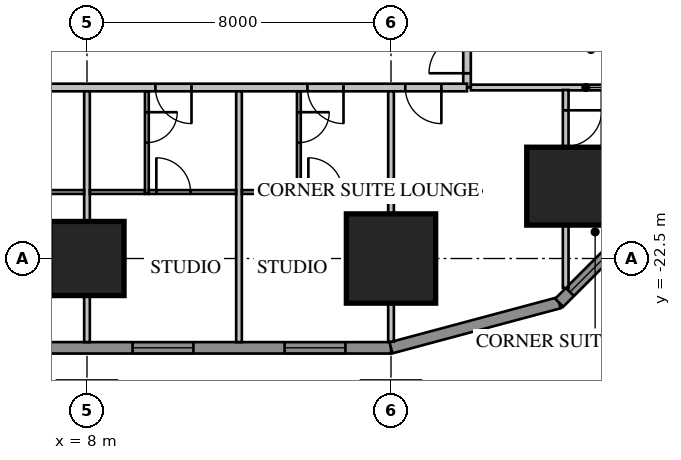
"""IFC4 building model, lengths in metres.
Left out: names, types, materials, properties, quantities, classifications, styles, units other than length and angle.
Written with IfcOpenShell. Run it as: python <this file> out.ifc"""

import sys

from ifc_helpers import new_model, si_unit, direction, frame, frame_2d, origin, origin_2d, place, context, subcontext, project, spatial, rectangle, extrude, element, fill, save


model = new_model("IFC4")
c1 = context("Model", 3, precision=1e-05, world=origin(), true_north=direction((0.0, 1.0)))
c2 = subcontext(c1, "Body", "Model", "MODEL_VIEW")
j1 = project(units=[si_unit("LENGTHUNIT", "METRE"), si_unit("PLANEANGLEUNIT", "RADIAN")], contexts=[c1])
p1 = place(None, origin())
s1 = spatial("IfcSite", under=j1, at=p1, CompositionType="ELEMENT")
p2 = place(p1, origin())
s2 = spatial("IfcBuilding", under=s1, at=p2, CompositionType="ELEMENT")
p3 = place(p2, frame((0.0, 0.0, 27.55)))
s3 = spatial("IfcBuildingStorey", under=s2, at=p3, CompositionType="ELEMENT", Elevation=27.55)
p4 = place(p3, frame((8.0, -22.5, 0.0), z_axis=(0.0, 0.0, 1.0), x_axis=(1.0, 0.0, 0.0)))
e1 = element("IfcColumn", 1, at=p4, inside=s3, PredefinedType="COLUMN", context=c2, shape_type="SweptSolid", body=[
    extrude(rectangle(XDim=1.95, YDim=1.95, at=origin_2d()), origin(), (0.0, 0.0, 1.0), 3.85),
])
p5 = place(p3, frame((16.0, -22.5, 0.0), z_axis=(0.0, 0.0, 1.0), x_axis=(1.0, 0.0, 0.0)))
e2 = element("IfcColumn", 2, at=p5, inside=s3, PredefinedType="COLUMN", context=c2, shape_type="SweptSolid", body=[
    extrude(rectangle(XDim=2.35, YDim=2.35, at=origin_2d()), origin(), (0.0, 0.0, 1.0), 3.85),
])
p6 = place(p3, frame((20.596, -20.596, 0.0), z_axis=(0.0, 0.0, 1.0), x_axis=(1.0, 0.0, 0.0)))
e3 = element("IfcColumn", 3, at=p6, inside=s3, PredefinedType="COLUMN", context=c2, shape_type="SweptSolid", body=[
    extrude(rectangle(XDim=2.05, YDim=2.05, at=origin_2d()), origin(), (0.0, 0.0, 1.0), 3.85),
])
p7 = place(p3, frame((-16.0, -24.85, 0.0), z_axis=(0.0, 0.0, 1.0), x_axis=(1.0, 0.0, 0.0)))
e4 = element("IfcWall", 4, at=p7, inside=s3, PredefinedType="SOLIDWALL", context=c2, shape_type="SweptSolid", body=[
    extrude(rectangle(XDim=32.0, YDim=0.3, at=frame_2d((16.0, 0.0))), origin(), (0.0, 0.0, 1.0), 3.65),
])
p8 = place(p7, frame((1.2, 0.0, 0.75)))
e5 = element("IfcOpeningElement", 5, at=p8, cuts=e4, PredefinedType="OPENING", context=c2, shape_type="SweptSolid", body=[
    extrude(rectangle(XDim=1.6, YDim=1.8, at=frame_2d((0.8, 0.9))), frame((0.0, 0.17, 0.0), z_axis=(0.0, -1.0, 0.0), x_axis=(1.0, 0.0, 0.0)), (0.0, 0.0, 1.0), 0.34),
])
p9 = place(p7, frame((5.2, 0.0, 0.75)))
e6 = element("IfcOpeningElement", 6, at=p9, cuts=e4, PredefinedType="OPENING", context=c2, shape_type="SweptSolid", body=[
    extrude(rectangle(XDim=1.6, YDim=1.8, at=frame_2d((0.8, 0.9))), frame((0.0, 0.17, 0.0), z_axis=(0.0, -1.0, 0.0), x_axis=(1.0, 0.0, 0.0)), (0.0, 0.0, 1.0), 0.34),
])
p10 = place(p7, frame((17.2, 0.0, 0.75)))
e7 = element("IfcOpeningElement", 7, at=p10, cuts=e4, PredefinedType="OPENING", context=c2, shape_type="SweptSolid", body=[
    extrude(rectangle(XDim=1.6, YDim=1.8, at=frame_2d((0.8, 0.9))), frame((0.0, 0.17, 0.0), z_axis=(0.0, -1.0, 0.0), x_axis=(1.0, 0.0, 0.0)), (0.0, 0.0, 1.0), 0.34),
])
p11 = place(p7, frame((21.2, 0.0, 0.75)))
e8 = element("IfcOpeningElement", 8, at=p11, cuts=e4, PredefinedType="OPENING", context=c2, shape_type="SweptSolid", body=[
    extrude(rectangle(XDim=1.6, YDim=1.8, at=frame_2d((0.8, 0.9))), frame((0.0, 0.17, 0.0), z_axis=(0.0, -1.0, 0.0), x_axis=(1.0, 0.0, 0.0)), (0.0, 0.0, 1.0), 0.34),
])
p12 = place(p7, frame((25.2, 0.0, 0.75)))
e9 = element("IfcOpeningElement", 9, at=p12, cuts=e4, PredefinedType="OPENING", context=c2, shape_type="SweptSolid", body=[
    extrude(rectangle(XDim=1.6, YDim=1.8, at=frame_2d((0.8, 0.9))), frame((0.0, 0.17, 0.0), z_axis=(0.0, -1.0, 0.0), x_axis=(1.0, 0.0, 0.0)), (0.0, 0.0, 1.0), 0.34),
])
p13 = place(p7, frame((29.2, 0.0, 0.75)))
e10 = element("IfcOpeningElement", 10, at=p13, cuts=e4, PredefinedType="OPENING", context=c2, shape_type="SweptSolid", body=[
    extrude(rectangle(XDim=1.6, YDim=1.8, at=frame_2d((0.8, 0.9))), frame((0.0, 0.17, 0.0), z_axis=(0.0, -1.0, 0.0), x_axis=(1.0, 0.0, 0.0)), (0.0, 0.0, 1.0), 0.34),
])
p14 = place(p7, frame((8.8, 0.0, 0.75)))
e11 = element("IfcOpeningElement", 11, at=p14, cuts=e4, PredefinedType="OPENING", context=c2, shape_type="SweptSolid", body=[
    extrude(rectangle(XDim=2.4, YDim=1.8, at=frame_2d((1.2, 0.9))), frame((0.0, 0.17, 0.0), z_axis=(0.0, -1.0, 0.0), x_axis=(1.0, 0.0, 0.0)), (0.0, 0.0, 1.0), 0.34),
])
p15 = place(p7, frame((13.812, 0.0, 0.0)))
e12 = element("IfcOpeningElement", 12, at=p15, cuts=e4, PredefinedType="OPENING", context=c2, shape_type="SweptSolid", body=[
    extrude(rectangle(XDim=1.0, YDim=2.4, at=frame_2d((0.5, 1.2))), frame((0.0, 0.17, 0.0), z_axis=(0.0, -1.0, 0.0), x_axis=(1.0, 0.0, 0.0)), (0.0, 0.0, 1.0), 0.34),
])
p16 = place(p3, frame((16.0, -24.85, 0.0), z_axis=(0.0, 0.0, 1.0), x_axis=(0.965920218567, 0.258839972501, 0.0)))
e13 = element("IfcWall", 13, at=p16, inside=s3, PredefinedType="SOLIDWALL", context=c2, shape_type="SweptSolid", body=[
    extrude(rectangle(XDim=4.581, YDim=0.3, at=frame_2d((2.291, 0.0))), origin(), (0.0, 0.0, 1.0), 3.65),
])
p17 = place(p3, frame((20.425, -23.664, 0.0), z_axis=(0.0, 0.0, 1.0), x_axis=(0.707106781187, 0.707106781187, 0.0)))
e14 = element("IfcWall", 14, at=p17, inside=s3, PredefinedType="SOLIDWALL", context=c2, shape_type="SweptSolid", body=[
    extrude(rectangle(XDim=4.581, YDim=0.3, at=frame_2d((2.291, 0.0))), origin(), (0.0, 0.0, 1.0), 3.65),
])
p18 = place(p17, frame((0.4, 0.0, 0.75)))
e15 = element("IfcOpeningElement", 15, at=p18, cuts=e14, PredefinedType="OPENING", context=c2, shape_type="SweptSolid", body=[
    extrude(rectangle(XDim=3.781, YDim=1.8, at=frame_2d((1.891, 0.9))), frame((0.0, 0.17, 0.0), z_axis=(0.0, -1.0, 0.0), x_axis=(1.0, 0.0, 0.0)), (0.0, 0.0, 1.0), 0.34),
])
p19 = place(p3, frame((18.0, -18.0, 0.0), z_axis=(0.0, 0.0, 1.0), x_axis=(0.0, 1.0, 0.0)))
e16 = element("IfcWall", 16, at=p19, inside=s3, PredefinedType="PARTITIONING", context=c2, shape_type="SweptSolid", body=[
    extrude(rectangle(XDim=36.0, YDim=0.2, at=frame_2d((18.0, 0.0))), origin(), (0.0, 0.0, 1.0), 3.65),
])
p20 = place(p19, frame((10.4, 0.0, 0.0)))
e17 = element("IfcOpeningElement", 17, at=p20, cuts=e16, PredefinedType="OPENING", context=c2, shape_type="SweptSolid", body=[
    extrude(rectangle(XDim=1.0, YDim=2.1, at=frame_2d((0.5, 1.05))), frame((0.0, 0.12, 0.0), z_axis=(0.0, -1.0, 0.0), x_axis=(1.0, 0.0, 0.0)), (0.0, 0.0, 1.0), 0.24),
])
p21 = place(p19, frame((0.375, 0.0, 0.0)))
e18 = element("IfcOpeningElement", 18, at=p21, cuts=e16, PredefinedType="OPENING", context=c2, shape_type="SweptSolid", body=[
    extrude(rectangle(XDim=1.0, YDim=2.1, at=frame_2d((0.5, 1.05))), frame((0.0, 0.12, 0.0), z_axis=(0.0, -1.0, 0.0), x_axis=(1.0, 0.0, 0.0)), (0.0, 0.0, 1.0), 0.24),
])
p22 = place(p19, frame((34.375, 0.0, 0.0)))
e19 = element("IfcOpeningElement", 19, at=p22, cuts=e16, PredefinedType="OPENING", context=c2, shape_type="SweptSolid", body=[
    extrude(rectangle(XDim=0.95, YDim=2.1, at=frame_2d((0.475, 1.05))), frame((0.0, 0.12, 0.0), z_axis=(0.0, -1.0, 0.0), x_axis=(1.0, 0.0, 0.0)), (0.0, 0.0, 1.0), 0.24),
])
p23 = place(p3, frame((18.1, -18.0, 0.0), z_axis=(0.0, 0.0, 1.0), x_axis=(1.0, 0.0, 0.0)))
e20 = element("IfcWall", 20, at=p23, inside=s3, PredefinedType="PARTITIONING", context=c2, shape_type="SweptSolid", body=[
    extrude(rectangle(XDim=6.053, YDim=0.15, at=frame_2d((3.027, 0.0))), origin(), (0.0, 0.0, 1.0), 3.65),
])
p24 = place(p3, frame((-18.0, -18.0, 0.0), z_axis=(0.0, 0.0, 1.0), x_axis=(1.0, 0.0, 0.0)))
e21 = element("IfcWall", 21, at=p24, inside=s3, PredefinedType="PARTITIONING", context=c2, shape_type="SweptSolid", body=[
    extrude(rectangle(XDim=36.0, YDim=0.2, at=frame_2d((18.0, 0.0))), origin(), (0.0, 0.0, 1.0), 3.65),
])
p25 = place(p24, frame((0.375, 0.0, 0.0)))
e22 = element("IfcOpeningElement", 22, at=p25, cuts=e21, PredefinedType="OPENING", context=c2, shape_type="SweptSolid", body=[
    extrude(rectangle(XDim=1.0, YDim=2.1, at=frame_2d((0.5, 1.05))), frame((0.0, 0.12, 0.0), z_axis=(0.0, -1.0, 0.0), x_axis=(1.0, 0.0, 0.0)), (0.0, 0.0, 1.0), 0.24),
])
p26 = place(p24, frame((2.45, 0.0, 0.0)))
e23 = element("IfcOpeningElement", 23, at=p26, cuts=e21, PredefinedType="OPENING", context=c2, shape_type="SweptSolid", body=[
    extrude(rectangle(XDim=0.8, YDim=2.1, at=frame_2d((0.4, 1.05))), frame((0.0, 0.12, 0.0), z_axis=(0.0, -1.0, 0.0), x_axis=(1.0, 0.0, 0.0)), (0.0, 0.0, 1.0), 0.24),
])
p27 = place(p24, frame((4.05, 0.0, 0.0)))
e24 = element("IfcOpeningElement", 24, at=p27, cuts=e21, PredefinedType="OPENING", context=c2, shape_type="SweptSolid", body=[
    extrude(rectangle(XDim=1.0, YDim=2.1, at=frame_2d((0.5, 1.05))), frame((0.0, 0.12, 0.0), z_axis=(0.0, -1.0, 0.0), x_axis=(1.0, 0.0, 0.0)), (0.0, 0.0, 1.0), 0.24),
])
p28 = place(p24, frame((6.45, 0.0, 0.0)))
e25 = element("IfcOpeningElement", 25, at=p28, cuts=e21, PredefinedType="OPENING", context=c2, shape_type="SweptSolid", body=[
    extrude(rectangle(XDim=0.9, YDim=2.1, at=frame_2d((0.45, 1.05))), frame((0.0, 0.12, 0.0), z_axis=(0.0, -1.0, 0.0), x_axis=(1.0, 0.0, 0.0)), (0.0, 0.0, 1.0), 0.24),
])
p29 = place(p24, frame((8.15, 0.0, 0.0)))
e26 = element("IfcOpeningElement", 26, at=p29, cuts=e21, PredefinedType="OPENING", context=c2, shape_type="SweptSolid", body=[
    extrude(rectangle(XDim=1.0, YDim=2.1, at=frame_2d((0.5, 1.05))), frame((0.0, 0.12, 0.0), z_axis=(0.0, -1.0, 0.0), x_axis=(1.0, 0.0, 0.0)), (0.0, 0.0, 1.0), 0.24),
])
p30 = place(p24, frame((19.8, 0.0, 0.0)))
e27 = element("IfcOpeningElement", 27, at=p30, cuts=e21, PredefinedType="OPENING", context=c2, shape_type="SweptSolid", body=[
    extrude(rectangle(XDim=0.95, YDim=2.1, at=frame_2d((0.475, 1.05))), frame((0.0, 0.12, 0.0), z_axis=(0.0, -1.0, 0.0), x_axis=(1.0, 0.0, 0.0)), (0.0, 0.0, 1.0), 0.24),
])
p31 = place(p24, frame((23.8, 0.0, 0.0)))
e28 = element("IfcOpeningElement", 28, at=p31, cuts=e21, PredefinedType="OPENING", context=c2, shape_type="SweptSolid", body=[
    extrude(rectangle(XDim=0.95, YDim=2.1, at=frame_2d((0.475, 1.05))), frame((0.0, 0.12, 0.0), z_axis=(0.0, -1.0, 0.0), x_axis=(1.0, 0.0, 0.0)), (0.0, 0.0, 1.0), 0.24),
])
p32 = place(p24, frame((27.8, 0.0, 0.0)))
e29 = element("IfcOpeningElement", 29, at=p32, cuts=e21, PredefinedType="OPENING", context=c2, shape_type="SweptSolid", body=[
    extrude(rectangle(XDim=0.95, YDim=2.1, at=frame_2d((0.475, 1.05))), frame((0.0, 0.12, 0.0), z_axis=(0.0, -1.0, 0.0), x_axis=(1.0, 0.0, 0.0)), (0.0, 0.0, 1.0), 0.24),
])
p33 = place(p24, frame((31.8, 0.0, 0.0)))
e30 = element("IfcOpeningElement", 30, at=p33, cuts=e21, PredefinedType="OPENING", context=c2, shape_type="SweptSolid", body=[
    extrude(rectangle(XDim=0.95, YDim=2.1, at=frame_2d((0.475, 1.05))), frame((0.0, 0.12, 0.0), z_axis=(0.0, -1.0, 0.0), x_axis=(1.0, 0.0, 0.0)), (0.0, 0.0, 1.0), 0.24),
])
p34 = place(p24, frame((34.375, 0.0, 0.0)))
e31 = element("IfcOpeningElement", 31, at=p34, cuts=e21, PredefinedType="OPENING", context=c2, shape_type="SweptSolid", body=[
    extrude(rectangle(XDim=0.95, YDim=2.1, at=frame_2d((0.475, 1.05))), frame((0.0, 0.12, 0.0), z_axis=(0.0, -1.0, 0.0), x_axis=(1.0, 0.0, 0.0)), (0.0, 0.0, 1.0), 0.24),
])
p35 = place(p24, frame((11.2, 0.0, 0.0)))
e32 = element("IfcOpeningElement", 32, at=p35, cuts=e21, PredefinedType="OPENING", context=c2, shape_type="SweptSolid", body=[
    extrude(rectangle(XDim=1.0, YDim=2.1, at=frame_2d((0.5, 1.05))), frame((0.0, 0.12, 0.0), z_axis=(0.0, -1.0, 0.0), x_axis=(1.0, 0.0, 0.0)), (0.0, 0.0, 1.0), 0.24),
])
for number, where, z_axis, x_axis in (
    (33, (8.0, -18.1, 0.0), (0.0, 0.0, 1.0), (0.0, -1.0, 0.0)),
    (34, (12.0, -18.1, 0.0), (0.0, 0.0, 1.0), (0.0, -1.0, 0.0)),
):
    element("IfcWall", number, at=place(p3, frame(where, z_axis=z_axis, x_axis=x_axis)), inside=s3, PredefinedType="PARTITIONING", context=c2, shape_type="SweptSolid", body=[
        extrude(rectangle(XDim=6.6, YDim=0.15, at=frame_2d((3.3, 0.0))), origin(), (0.0, 0.0, 1.0), 3.65),
    ])
p36 = place(p3, frame((16.0, -18.1, 0.0), z_axis=(0.0, 0.0, 1.0), x_axis=(0.0, -1.0, 0.0)))
e35 = element("IfcWall", 35, at=p36, inside=s3, PredefinedType="PARTITIONING", context=c2, shape_type="SweptSolid", body=[
    extrude(rectangle(XDim=6.589, YDim=0.15, at=frame_2d((3.295, 0.0))), origin(), (0.0, 0.0, 1.0), 3.65),
])
p37 = place(p3, frame((9.575, -18.1, 0.0), z_axis=(0.0, 0.0, 1.0), x_axis=(0.0, -1.0, 0.0)))
e36 = element("IfcWall", 36, at=p37, inside=s3, PredefinedType="PARTITIONING", context=c2, shape_type="SweptSolid", body=[
    extrude(rectangle(XDim=2.7, YDim=0.1, at=frame_2d((1.35, 0.0))), origin(), (0.0, 0.0, 1.0), 3.65),
])
p38 = place(p37, frame((0.55, 0.0, 0.0)))
e37 = element("IfcOpeningElement", 37, at=p38, cuts=e36, PredefinedType="OPENING", context=c2, shape_type="SweptSolid", body=[
    extrude(rectangle(XDim=0.8, YDim=2.1, at=frame_2d((0.4, 1.05))), frame((0.0, 0.07, 0.0), z_axis=(0.0, -1.0, 0.0), x_axis=(1.0, 0.0, 0.0)), (0.0, 0.0, 1.0), 0.14),
])
p39 = place(p3, frame((8.075, -20.75, 0.0), z_axis=(0.0, 0.0, 1.0), x_axis=(1.0, 0.0, 0.0)))
e38 = element("IfcWall", 38, at=p39, inside=s3, PredefinedType="PARTITIONING", context=c2, shape_type="SweptSolid", body=[
    extrude(rectangle(XDim=1.45, YDim=0.1, at=frame_2d((0.725, 0.0))), origin(), (0.0, 0.0, 1.0), 3.65),
])
p40 = place(p3, frame((13.575, -18.1, 0.0), z_axis=(0.0, 0.0, 1.0), x_axis=(0.0, -1.0, 0.0)))
e39 = element("IfcWall", 39, at=p40, inside=s3, PredefinedType="PARTITIONING", context=c2, shape_type="SweptSolid", body=[
    extrude(rectangle(XDim=2.7, YDim=0.1, at=frame_2d((1.35, 0.0))), origin(), (0.0, 0.0, 1.0), 3.65),
])
p41 = place(p40, frame((0.55, 0.0, 0.0)))
e40 = element("IfcOpeningElement", 40, at=p41, cuts=e39, PredefinedType="OPENING", context=c2, shape_type="SweptSolid", body=[
    extrude(rectangle(XDim=0.8, YDim=2.1, at=frame_2d((0.4, 1.05))), frame((0.0, 0.07, 0.0), z_axis=(0.0, -1.0, 0.0), x_axis=(1.0, 0.0, 0.0)), (0.0, 0.0, 1.0), 0.14),
])
p42 = place(p3, frame((12.075, -20.75, 0.0), z_axis=(0.0, 0.0, 1.0), x_axis=(1.0, 0.0, 0.0)))
e41 = element("IfcWall", 41, at=p42, inside=s3, PredefinedType="PARTITIONING", context=c2, shape_type="SweptSolid", body=[
    extrude(rectangle(XDim=1.45, YDim=0.1, at=frame_2d((0.725, 0.0))), origin(), (0.0, 0.0, 1.0), 3.65),
])
p43 = place(p3, frame((20.596, -18.065, 0.0), z_axis=(0.0, 0.0, 1.0), x_axis=(0.0, -1.0, 0.0)))
e42 = element("IfcWall", 42, at=p43, inside=s3, PredefinedType="PARTITIONING", context=c2, shape_type="SweptSolid", body=[
    extrude(rectangle(XDim=5.209, YDim=0.15, at=frame_2d((2.604, 0.0))), origin(), (0.0, 0.0, 1.0), 3.65),
])
p44 = place(p43, frame((0.535, 0.0, 0.0)))
e43 = element("IfcOpeningElement", 43, at=p44, cuts=e42, PredefinedType="OPENING", context=c2, shape_type="SweptSolid", body=[
    extrude(rectangle(XDim=0.95, YDim=2.1, at=frame_2d((0.475, 1.05))), frame((0.0, 0.095, 0.0), z_axis=(0.0, -1.0, 0.0), x_axis=(1.0, 0.0, 0.0)), (0.0, 0.0, 1.0), 0.19),
])
p45 = place(p3, frame((5.625, -20.75, 0.0), z_axis=(0.0, 0.0, 1.0), x_axis=(1.0, 0.0, 0.0)))
e44 = element("IfcWall", 44, at=p45, inside=s3, PredefinedType="PARTITIONING", context=c2, shape_type="SweptSolid", body=[
    extrude(rectangle(XDim=2.3, YDim=0.1, at=frame_2d((1.15, 0.0))), origin(), (0.0, 0.0, 1.0), 3.65),
])
p46 = place(p45, frame((0.2, 0.0, 0.0)))
e45 = element("IfcOpeningElement", 45, at=p46, cuts=e44, PredefinedType="OPENING", context=c2, shape_type="SweptSolid", body=[
    extrude(rectangle(XDim=0.9, YDim=2.1, at=frame_2d((0.45, 1.05))), frame((0.0, 0.07, 0.0), z_axis=(0.0, -1.0, 0.0), x_axis=(1.0, 0.0, 0.0)), (0.0, 0.0, 1.0), 0.14),
])
p47 = place(p3, frame((9.625, -20.75, 0.0), z_axis=(0.0, 0.0, 1.0), x_axis=(1.0, 0.0, 0.0)))
e46 = element("IfcWall", 46, at=p47, inside=s3, PredefinedType="PARTITIONING", context=c2, shape_type="SweptSolid", body=[
    extrude(rectangle(XDim=2.3, YDim=0.1, at=frame_2d((1.15, 0.0))), origin(), (0.0, 0.0, 1.0), 3.65),
])
p48 = place(p47, frame((0.2, 0.0, 0.0)))
e47 = element("IfcOpeningElement", 47, at=p48, cuts=e46, PredefinedType="OPENING", context=c2, shape_type="SweptSolid", body=[
    extrude(rectangle(XDim=0.9, YDim=2.1, at=frame_2d((0.45, 1.05))), frame((0.0, 0.07, 0.0), z_axis=(0.0, -1.0, 0.0), x_axis=(1.0, 0.0, 0.0)), (0.0, 0.0, 1.0), 0.14),
])
p49 = place(p3, frame((13.625, -20.75, 0.0), z_axis=(0.0, 0.0, 1.0), x_axis=(1.0, 0.0, 0.0)))
e48 = element("IfcWall", 48, at=p49, inside=s3, PredefinedType="PARTITIONING", context=c2, shape_type="SweptSolid", body=[
    extrude(rectangle(XDim=2.3, YDim=0.1, at=frame_2d((1.15, 0.0))), origin(), (0.0, 0.0, 1.0), 3.65),
])
p50 = place(p49, frame((0.2, 0.0, 0.0)))
e49 = element("IfcOpeningElement", 49, at=p50, cuts=e48, PredefinedType="OPENING", context=c2, shape_type="SweptSolid", body=[
    extrude(rectangle(XDim=0.9, YDim=2.1, at=frame_2d((0.45, 1.05))), frame((0.0, 0.07, 0.0), z_axis=(0.0, -1.0, 0.0), x_axis=(1.0, 0.0, 0.0)), (0.0, 0.0, 1.0), 0.14),
])
p51 = place(p12, origin())
e50 = element("IfcWindow", 50, at=p51, inside=s3, PartitioningType="SINGLE_PANEL", PredefinedType="WINDOW", context=c2, shape_type="SweptSolid", body=[
    extrude(rectangle(XDim=1.6, YDim=1.8, at=frame_2d((0.8, 0.9))), frame((0.0, 0.03, 0.0), z_axis=(0.0, -1.0, 0.0), x_axis=(1.0, 0.0, 0.0)), (0.0, 0.0, 1.0), 0.06),
])
fill(e9, e50)
p52 = place(p13, origin())
e51 = element("IfcWindow", 51, at=p52, inside=s3, PartitioningType="SINGLE_PANEL", PredefinedType="WINDOW", context=c2, shape_type="SweptSolid", body=[
    extrude(rectangle(XDim=1.6, YDim=1.8, at=frame_2d((0.8, 0.9))), frame((0.0, 0.03, 0.0), z_axis=(0.0, -1.0, 0.0), x_axis=(1.0, 0.0, 0.0)), (0.0, 0.0, 1.0), 0.06),
])
fill(e10, e51)
p53 = place(p18, origin())
e52 = element("IfcWindow", 52, at=p53, inside=s3, PartitioningType="SINGLE_PANEL", PredefinedType="WINDOW", context=c2, shape_type="SweptSolid", body=[
    extrude(rectangle(XDim=3.781, YDim=1.8, at=frame_2d((1.891, 0.9))), frame((0.0, 0.03, 0.0), z_axis=(0.0, -1.0, 0.0), x_axis=(1.0, 0.0, 0.0)), (0.0, 0.0, 1.0), 0.06),
])
fill(e15, e52)
p54 = place(p21, origin())
e53 = element("IfcDoor", 53, at=p54, inside=s3, OperationType="SINGLE_SWING_LEFT", PredefinedType="DOOR", context=c2, shape_type="SweptSolid", body=[
    extrude(rectangle(XDim=1.0, YDim=2.1, at=frame_2d((0.5, 1.05))), frame((0.0, 0.025, 0.0), z_axis=(0.0, -1.0, 0.0), x_axis=(1.0, 0.0, 0.0)), (0.0, 0.0, 1.0), 0.05),
])
fill(e18, e53)
p55 = place(p32, origin())
e54 = element("IfcDoor", 54, at=p55, inside=s3, OperationType="SINGLE_SWING_RIGHT", PredefinedType="DOOR", context=c2, shape_type="SweptSolid", body=[
    extrude(rectangle(XDim=0.95, YDim=2.1, at=frame_2d((0.475, 1.05))), frame((0.0, 0.025, 0.0), z_axis=(0.0, -1.0, 0.0), x_axis=(1.0, 0.0, 0.0)), (0.0, 0.0, 1.0), 0.05),
])
fill(e29, e54)
p56 = place(p38, origin())
e55 = element("IfcDoor", 55, at=p56, inside=s3, OperationType="SINGLE_SWING_LEFT", PredefinedType="DOOR", context=c2, shape_type="SweptSolid", body=[
    extrude(rectangle(XDim=0.8, YDim=2.1, at=frame_2d((0.4, 1.05))), frame((0.0, 0.025, 0.0), z_axis=(0.0, -1.0, 0.0), x_axis=(1.0, 0.0, 0.0)), (0.0, 0.0, 1.0), 0.05),
])
fill(e37, e55)
p57 = place(p33, origin())
e56 = element("IfcDoor", 56, at=p57, inside=s3, OperationType="SINGLE_SWING_RIGHT", PredefinedType="DOOR", context=c2, shape_type="SweptSolid", body=[
    extrude(rectangle(XDim=0.95, YDim=2.1, at=frame_2d((0.475, 1.05))), frame((0.0, 0.025, 0.0), z_axis=(0.0, -1.0, 0.0), x_axis=(1.0, 0.0, 0.0)), (0.0, 0.0, 1.0), 0.05),
])
fill(e30, e56)
p58 = place(p41, origin())
e57 = element("IfcDoor", 57, at=p58, inside=s3, OperationType="SINGLE_SWING_LEFT", PredefinedType="DOOR", context=c2, shape_type="SweptSolid", body=[
    extrude(rectangle(XDim=0.8, YDim=2.1, at=frame_2d((0.4, 1.05))), frame((0.0, 0.025, 0.0), z_axis=(0.0, -1.0, 0.0), x_axis=(1.0, 0.0, 0.0)), (0.0, 0.0, 1.0), 0.05),
])
fill(e40, e57)
p59 = place(p34, origin())
e58 = element("IfcDoor", 58, at=p59, inside=s3, OperationType="SINGLE_SWING_RIGHT", PredefinedType="DOOR", context=c2, shape_type="SweptSolid", body=[
    extrude(rectangle(XDim=0.95, YDim=2.1, at=frame_2d((0.475, 1.05))), frame((0.0, 0.025, 0.0), z_axis=(0.0, -1.0, 0.0), x_axis=(1.0, 0.0, 0.0)), (0.0, 0.0, 1.0), 0.05),
])
fill(e31, e58)
p60 = place(p44, origin())
e59 = element("IfcDoor", 59, at=p60, inside=s3, OperationType="SINGLE_SWING_LEFT", PredefinedType="DOOR", context=c2, shape_type="SweptSolid", body=[
    extrude(rectangle(XDim=0.95, YDim=2.1, at=frame_2d((0.475, 1.05))), frame((0.0, 0.025, 0.0), z_axis=(0.0, -1.0, 0.0), x_axis=(1.0, 0.0, 0.0)), (0.0, 0.0, 1.0), 0.05),
])
fill(e43, e59)
p61 = place(p48, origin())
e60 = element("IfcDoor", 60, at=p61, inside=s3, OperationType="SINGLE_SWING_LEFT", PredefinedType="DOOR", context=c2, shape_type="SweptSolid", body=[
    extrude(rectangle(XDim=0.9, YDim=2.1, at=frame_2d((0.45, 1.05))), frame((0.0, 0.025, 0.0), z_axis=(0.0, -1.0, 0.0), x_axis=(1.0, 0.0, 0.0)), (0.0, 0.0, 1.0), 0.05),
])
fill(e47, e60)
p62 = place(p50, origin())
e61 = element("IfcDoor", 61, at=p62, inside=s3, OperationType="SINGLE_SWING_LEFT", PredefinedType="DOOR", context=c2, shape_type="SweptSolid", body=[
    extrude(rectangle(XDim=0.9, YDim=2.1, at=frame_2d((0.45, 1.05))), frame((0.0, 0.025, 0.0), z_axis=(0.0, -1.0, 0.0), x_axis=(1.0, 0.0, 0.0)), (0.0, 0.0, 1.0), 0.05),
])
fill(e49, e61)
save(model, sys.argv[1])
